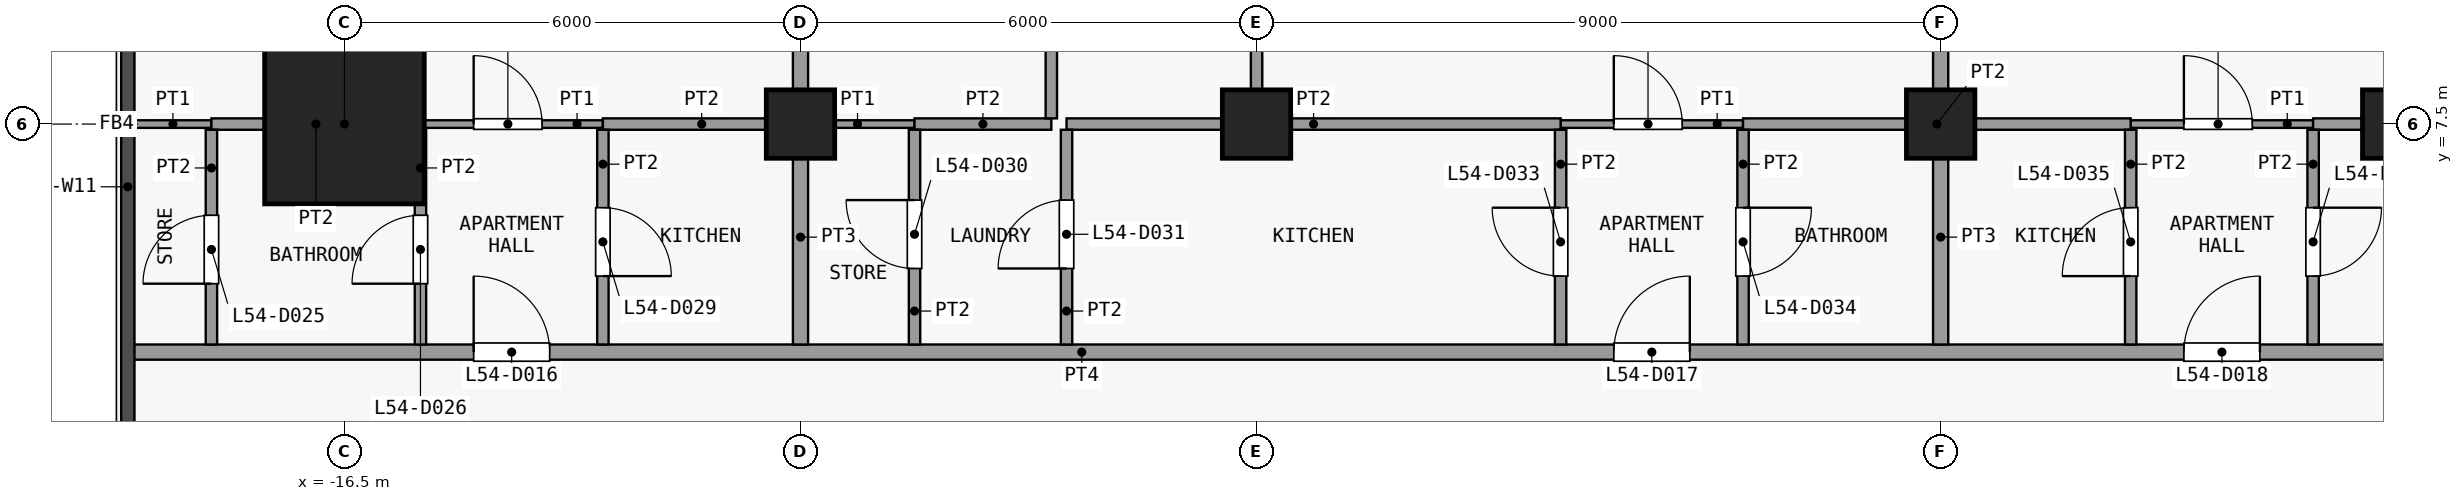
"""IFC4 building model, lengths in metres.
Left out: names, types, materials, properties, quantities, classifications, styles, units other than length and angle.
Written with IfcOpenShell. Run it as: python <this file> out.ifc"""

import sys

from ifc_helpers import new_model, si_unit, direction, frame, frame_2d, origin, origin_2d, place, context, subcontext, project, spatial, rectangle, extrude, element, fill, save


model = new_model("IFC4")
c1 = context("Model", 3, precision=1e-05, world=origin(), true_north=direction((0.0, 1.0)))
c2 = subcontext(c1, "Body", "Model", "MODEL_VIEW")
j1 = project(units=[si_unit("LENGTHUNIT", "METRE"), si_unit("PLANEANGLEUNIT", "RADIAN")], contexts=[c1])
p1 = place(None, origin())
s1 = spatial("IfcSite", under=j1, at=p1, CompositionType="ELEMENT")
p2 = place(p1, origin())
s2 = spatial("IfcBuilding", under=s1, at=p2, CompositionType="ELEMENT")
p3 = place(p2, frame((0.0, 0.0, 215.9)))
s3 = spatial("IfcBuildingStorey", under=s2, at=p3, CompositionType="ELEMENT", Elevation=215.9)
p4 = place(p3, frame((-16.5, 7.5, 0.0), z_axis=(0.0, 0.0, 1.0), x_axis=(1.0, 0.0, 0.0)))
e1 = element("IfcColumn", 1, at=p4, inside=s3, PredefinedType="COLUMN", context=c2, shape_type="SweptSolid", body=[
    extrude(rectangle(XDim=2.1, YDim=2.1, at=origin_2d()), origin(), (0.0, 0.0, 1.0), 3.6),
])
for number, where, z_axis, x_axis in (
    (2, (-10.5, 7.5, 0.0), (0.0, 0.0, 1.0), (1.0, 0.0, 0.0)),
    (3, (-4.5, 7.5, 0.0), (0.0, 0.0, 1.0), (1.0, 0.0, 0.0)),
    (4, (4.5, 7.5, 0.0), (0.0, 0.0, 1.0), (1.0, 0.0, 0.0)),
    (5, (10.5, 7.5, 0.0), (0.0, 0.0, 1.0), (1.0, 0.0, 0.0)),
):
    element("IfcColumn", number, at=place(p3, frame(where, z_axis=z_axis, x_axis=x_axis)), inside=s3, PredefinedType="COLUMN", context=c2, shape_type="SweptSolid", body=[
        extrude(rectangle(XDim=0.9, YDim=0.9, at=origin_2d()), origin(), (0.0, 0.0, 1.0), 3.6),
    ])
p5 = place(p3, frame((-19.35, 4.5, 0.0), z_axis=(0.0, 0.0, 1.0), x_axis=(1.0, 0.0, 0.0)))
e6 = element("IfcWall", 6, at=p5, inside=s3, PredefinedType="PARTITIONING", context=c2, shape_type="SweptSolid", body=[
    extrude(rectangle(XDim=38.7, YDim=0.2, at=frame_2d((19.35, 0.0))), origin(), (0.0, 0.0, 1.0), 3.3),
])
p6 = place(p5, frame((4.55, 0.0, 0.0)))
e7 = element("IfcOpeningElement", 7, at=p6, cuts=e6, PredefinedType="OPENING", context=c2, shape_type="SweptSolid", body=[
    extrude(rectangle(XDim=1.0, YDim=2.1, at=frame_2d((0.5, 1.05))), frame((0.0, 0.11, 0.0), z_axis=(0.0, -1.0, 0.0), x_axis=(1.0, 0.0, 0.0)), (0.0, 0.0, 1.0), 0.22),
])
p7 = place(p5, frame((19.55, 0.0, 0.0)))
e8 = element("IfcOpeningElement", 8, at=p7, cuts=e6, PredefinedType="OPENING", context=c2, shape_type="SweptSolid", body=[
    extrude(rectangle(XDim=1.0, YDim=2.1, at=frame_2d((0.5, 1.05))), frame((0.0, 0.11, 0.0), z_axis=(0.0, -1.0, 0.0), x_axis=(1.0, 0.0, 0.0)), (0.0, 0.0, 1.0), 0.22),
])
p8 = place(p5, frame((27.05, 0.0, 0.0)))
e9 = element("IfcOpeningElement", 9, at=p8, cuts=e6, PredefinedType="OPENING", context=c2, shape_type="SweptSolid", body=[
    extrude(rectangle(XDim=1.0, YDim=2.1, at=frame_2d((0.5, 1.05))), frame((0.0, 0.11, 0.0), z_axis=(0.0, -1.0, 0.0), x_axis=(1.0, 0.0, 0.0)), (0.0, 0.0, 1.0), 0.22),
])
p9 = place(p3, frame((-19.262, 7.5, 0.0), z_axis=(0.0, 0.0, 1.0), x_axis=(1.0, 0.0, 0.0)))
e10 = element("IfcWall", 10, at=p9, inside=s3, PredefinedType="PARTITIONING", context=c2, shape_type="SweptSolid", body=[
    extrude(rectangle(XDim=1.012, YDim=0.1, at=frame_2d((0.506, 0.0))), origin(), (0.0, 0.0, 1.0), 3.3),
])
p10 = place(p3, frame((-15.5, 7.5, 0.0), z_axis=(0.0, 0.0, 1.0), x_axis=(1.0, 0.0, 0.0)))
e11 = element("IfcWall", 11, at=p10, inside=s3, PredefinedType="PARTITIONING", context=c2, shape_type="SweptSolid", body=[
    extrude(rectangle(XDim=2.4, YDim=0.1, at=frame_2d((1.2, 0.0))), origin(), (0.0, 0.0, 1.0), 3.3),
])
p11 = place(p10, frame((0.7, 0.0, 0.0)))
e12 = element("IfcOpeningElement", 12, at=p11, cuts=e11, PredefinedType="OPENING", context=c2, shape_type="SweptSolid", body=[
    extrude(rectangle(XDim=0.9, YDim=2.1, at=frame_2d((0.45, 1.05))), frame((0.0, 0.06, 0.0), z_axis=(0.0, -1.0, 0.0), x_axis=(1.0, 0.0, 0.0)), (0.0, 0.0, 1.0), 0.12),
])
p12 = place(p3, frame((-10.5, 7.5, 0.0), z_axis=(0.0, 0.0, 1.0), x_axis=(1.0, 0.0, 0.0)))
e13 = element("IfcWall", 13, at=p12, inside=s3, PredefinedType="PARTITIONING", context=c2, shape_type="SweptSolid", body=[
    extrude(rectangle(XDim=1.5, YDim=0.1, at=frame_2d((0.75, 0.0))), origin(), (0.0, 0.0, 1.0), 3.3),
])
p13 = place(p3, frame((-0.5, 7.5, 0.0), z_axis=(0.0, 0.0, 1.0), x_axis=(1.0, 0.0, 0.0)))
e14 = element("IfcWall", 14, at=p13, inside=s3, PredefinedType="PARTITIONING", context=c2, shape_type="SweptSolid", body=[
    extrude(rectangle(XDim=2.4, YDim=0.1, at=frame_2d((1.2, 0.0))), origin(), (0.0, 0.0, 1.0), 3.3),
])
p14 = place(p13, frame((0.7, 0.0, 0.0)))
e15 = element("IfcOpeningElement", 15, at=p14, cuts=e14, PredefinedType="OPENING", context=c2, shape_type="SweptSolid", body=[
    extrude(rectangle(XDim=0.9, YDim=2.1, at=frame_2d((0.45, 1.05))), frame((0.0, 0.06, 0.0), z_axis=(0.0, -1.0, 0.0), x_axis=(1.0, 0.0, 0.0)), (0.0, 0.0, 1.0), 0.12),
])
p15 = place(p3, frame((7.0, 7.5, 0.0), z_axis=(0.0, 0.0, 1.0), x_axis=(1.0, 0.0, 0.0)))
e16 = element("IfcWall", 16, at=p15, inside=s3, PredefinedType="PARTITIONING", context=c2, shape_type="SweptSolid", body=[
    extrude(rectangle(XDim=2.4, YDim=0.1, at=frame_2d((1.2, 0.0))), origin(), (0.0, 0.0, 1.0), 3.3),
])
p16 = place(p15, frame((0.7, 0.0, 0.0)))
e17 = element("IfcOpeningElement", 17, at=p16, cuts=e16, PredefinedType="OPENING", context=c2, shape_type="SweptSolid", body=[
    extrude(rectangle(XDim=0.9, YDim=2.1, at=frame_2d((0.45, 1.05))), frame((0.0, 0.06, 0.0), z_axis=(0.0, -1.0, 0.0), x_axis=(1.0, 0.0, 0.0)), (0.0, 0.0, 1.0), 0.12),
])
p17 = place(p3, frame((-18.25, 7.5, 0.0), z_axis=(0.0, 0.0, 1.0), x_axis=(1.0, 0.0, 0.0)))
e18 = element("IfcWall", 18, at=p17, inside=s3, PredefinedType="PARTITIONING", context=c2, shape_type="SweptSolid", body=[
    extrude(rectangle(XDim=2.75, YDim=0.15, at=frame_2d((1.375, 0.0))), origin(), (0.0, 0.0, 1.0), 3.3),
])
p18 = place(p3, frame((-13.1, 7.5, 0.0), z_axis=(0.0, 0.0, 1.0), x_axis=(1.0, 0.0, 0.0)))
e19 = element("IfcWall", 19, at=p18, inside=s3, PredefinedType="PARTITIONING", context=c2, shape_type="SweptSolid", body=[
    extrude(rectangle(XDim=2.6, YDim=0.15, at=frame_2d((1.3, 0.0))), origin(), (0.0, 0.0, 1.0), 3.3),
])
p19 = place(p3, frame((-9.0, 7.5, 0.0), z_axis=(0.0, 0.0, 1.0), x_axis=(1.0, 0.0, 0.0)))
e20 = element("IfcWall", 20, at=p19, inside=s3, PredefinedType="PARTITIONING", context=c2, shape_type="SweptSolid", body=[
    extrude(rectangle(XDim=1.8, YDim=0.15, at=frame_2d((0.9, 0.0))), origin(), (0.0, 0.0, 1.0), 3.3),
])
p20 = place(p3, frame((-7.0, 7.5, 0.0), z_axis=(0.0, 0.0, 1.0), x_axis=(1.0, 0.0, 0.0)))
e21 = element("IfcWall", 21, at=p20, inside=s3, PredefinedType="PARTITIONING", context=c2, shape_type="SweptSolid", body=[
    extrude(rectangle(XDim=6.5, YDim=0.15, at=frame_2d((3.25, 0.0))), origin(), (0.0, 0.0, 1.0), 3.3),
])
p21 = place(p3, frame((1.9, 7.5, 0.0), z_axis=(0.0, 0.0, 1.0), x_axis=(1.0, 0.0, 0.0)))
e22 = element("IfcWall", 22, at=p21, inside=s3, PredefinedType="PARTITIONING", context=c2, shape_type="SweptSolid", body=[
    extrude(rectangle(XDim=5.1, YDim=0.15, at=frame_2d((2.55, 0.0))), origin(), (0.0, 0.0, 1.0), 3.3),
])
p22 = place(p3, frame((9.4, 7.5, 0.0), z_axis=(0.0, 0.0, 1.0), x_axis=(1.0, 0.0, 0.0)))
e23 = element("IfcWall", 23, at=p22, inside=s3, PredefinedType="PARTITIONING", context=c2, shape_type="SweptSolid", body=[
    extrude(rectangle(XDim=8.25, YDim=0.15, at=frame_2d((4.125, 0.0))), origin(), (0.0, 0.0, 1.0), 3.3),
])
p23 = place(p3, frame((-18.25, 4.6, 0.0), z_axis=(0.0, 0.0, 1.0), x_axis=(0.0, 1.0, 0.0)))
e24 = element("IfcWall", 24, at=p23, inside=s3, PredefinedType="PARTITIONING", context=c2, shape_type="SweptSolid", body=[
    extrude(rectangle(XDim=2.825, YDim=0.15, at=frame_2d((1.413, 0.0))), origin(), (0.0, 0.0, 1.0), 3.3),
])
p24 = place(p23, frame((0.8, 0.0, 0.0)))
e25 = element("IfcOpeningElement", 25, at=p24, cuts=e24, PredefinedType="OPENING", context=c2, shape_type="SweptSolid", body=[
    extrude(rectangle(XDim=0.9, YDim=2.1, at=frame_2d((0.45, 1.05))), frame((0.0, 0.085, 0.0), z_axis=(0.0, -1.0, 0.0), x_axis=(1.0, 0.0, 0.0)), (0.0, 0.0, 1.0), 0.17),
])
p25 = place(p3, frame((-15.5, 4.6, 0.0), z_axis=(0.0, 0.0, 1.0), x_axis=(0.0, 1.0, 0.0)))
e26 = element("IfcWall", 26, at=p25, inside=s3, PredefinedType="PARTITIONING", context=c2, shape_type="SweptSolid", body=[
    extrude(rectangle(XDim=2.825, YDim=0.15, at=frame_2d((1.413, 0.0))), origin(), (0.0, 0.0, 1.0), 3.3),
])
p26 = place(p25, frame((0.8, 0.0, 0.0)))
e27 = element("IfcOpeningElement", 27, at=p26, cuts=e26, PredefinedType="OPENING", context=c2, shape_type="SweptSolid", body=[
    extrude(rectangle(XDim=0.9, YDim=2.1, at=frame_2d((0.45, 1.05))), frame((0.0, 0.085, 0.0), z_axis=(0.0, -1.0, 0.0), x_axis=(1.0, 0.0, 0.0)), (0.0, 0.0, 1.0), 0.17),
])
p27 = place(p3, frame((-13.1, 4.6, 0.0), z_axis=(0.0, 0.0, 1.0), x_axis=(0.0, 1.0, 0.0)))
e28 = element("IfcWall", 28, at=p27, inside=s3, PredefinedType="PARTITIONING", context=c2, shape_type="SweptSolid", body=[
    extrude(rectangle(XDim=2.825, YDim=0.15, at=frame_2d((1.413, 0.0))), origin(), (0.0, 0.0, 1.0), 3.3),
])
p28 = place(p27, frame((0.9, 0.0, 0.0)))
e29 = element("IfcOpeningElement", 29, at=p28, cuts=e28, PredefinedType="OPENING", context=c2, shape_type="SweptSolid", body=[
    extrude(rectangle(XDim=0.9, YDim=2.1, at=frame_2d((0.45, 1.05))), frame((0.0, 0.085, 0.0), z_axis=(0.0, -1.0, 0.0), x_axis=(1.0, 0.0, 0.0)), (0.0, 0.0, 1.0), 0.17),
])
p29 = place(p3, frame((-10.5, 4.6, 0.0), z_axis=(0.0, 0.0, 1.0), x_axis=(0.0, 1.0, 0.0)))
e30 = element("IfcWall", 30, at=p29, inside=s3, PredefinedType="PARTITIONING", context=c2, shape_type="SweptSolid", body=[
    extrude(rectangle(XDim=2.825, YDim=0.2, at=frame_2d((1.413, 0.0))), origin(), (0.0, 0.0, 1.0), 3.3),
])
p30 = place(p3, frame((-10.5, 7.575, 0.0), z_axis=(0.0, 0.0, 1.0), x_axis=(0.0, 1.0, 0.0)))
e31 = element("IfcWall", 31, at=p30, inside=s3, PredefinedType="PARTITIONING", context=c2, shape_type="SweptSolid", body=[
    extrude(rectangle(XDim=8.688, YDim=0.2, at=frame_2d((4.344, 0.0))), origin(), (0.0, 0.0, 1.0), 3.3),
])
p31 = place(p3, frame((-9.0, 4.6, 0.0), z_axis=(0.0, 0.0, 1.0), x_axis=(0.0, 1.0, 0.0)))
e32 = element("IfcWall", 32, at=p31, inside=s3, PredefinedType="PARTITIONING", context=c2, shape_type="SweptSolid", body=[
    extrude(rectangle(XDim=2.825, YDim=0.15, at=frame_2d((1.413, 0.0))), origin(), (0.0, 0.0, 1.0), 3.3),
])
p32 = place(p31, frame((1.0, 0.0, 0.0)))
e33 = element("IfcOpeningElement", 33, at=p32, cuts=e32, PredefinedType="OPENING", context=c2, shape_type="SweptSolid", body=[
    extrude(rectangle(XDim=0.9, YDim=2.1, at=frame_2d((0.45, 1.05))), frame((0.0, 0.085, 0.0), z_axis=(0.0, -1.0, 0.0), x_axis=(1.0, 0.0, 0.0)), (0.0, 0.0, 1.0), 0.17),
])
p33 = place(p3, frame((-7.2, 7.575, 0.0), z_axis=(0.0, 0.0, 1.0), x_axis=(0.0, 1.0, 0.0)))
e34 = element("IfcWall", 34, at=p33, inside=s3, PredefinedType="PARTITIONING", context=c2, shape_type="SweptSolid", body=[
    extrude(rectangle(XDim=2.85, YDim=0.15, at=frame_2d((1.425, 0.0))), origin(), (0.0, 0.0, 1.0), 3.3),
])
p34 = place(p3, frame((-7.0, 4.6, 0.0), z_axis=(0.0, 0.0, 1.0), x_axis=(0.0, 1.0, 0.0)))
e35 = element("IfcWall", 35, at=p34, inside=s3, PredefinedType="PARTITIONING", context=c2, shape_type="SweptSolid", body=[
    extrude(rectangle(XDim=2.825, YDim=0.15, at=frame_2d((1.413, 0.0))), origin(), (0.0, 0.0, 1.0), 3.3),
])
p35 = place(p34, frame((1.0, 0.0, 0.0)))
e36 = element("IfcOpeningElement", 36, at=p35, cuts=e35, PredefinedType="OPENING", context=c2, shape_type="SweptSolid", body=[
    extrude(rectangle(XDim=0.9, YDim=2.1, at=frame_2d((0.45, 1.05))), frame((0.0, 0.085, 0.0), z_axis=(0.0, -1.0, 0.0), x_axis=(1.0, 0.0, 0.0)), (0.0, 0.0, 1.0), 0.17),
])
p36 = place(p3, frame((-4.5, 7.575, 0.0), z_axis=(0.0, 0.0, 1.0), x_axis=(0.0, 1.0, 0.0)))
e37 = element("IfcWall", 37, at=p36, inside=s3, PredefinedType="PARTITIONING", context=c2, shape_type="SweptSolid", body=[
    extrude(rectangle(XDim=2.925, YDim=0.15, at=frame_2d((1.462, 0.0))), origin(), (0.0, 0.0, 1.0), 3.3),
])
p37 = place(p3, frame((-0.5, 4.6, 0.0), z_axis=(0.0, 0.0, 1.0), x_axis=(0.0, 1.0, 0.0)))
e38 = element("IfcWall", 38, at=p37, inside=s3, PredefinedType="PARTITIONING", context=c2, shape_type="SweptSolid", body=[
    extrude(rectangle(XDim=2.825, YDim=0.15, at=frame_2d((1.413, 0.0))), origin(), (0.0, 0.0, 1.0), 3.3),
])
p38 = place(p37, frame((0.9, 0.0, 0.0)))
e39 = element("IfcOpeningElement", 39, at=p38, cuts=e38, PredefinedType="OPENING", context=c2, shape_type="SweptSolid", body=[
    extrude(rectangle(XDim=0.9, YDim=2.1, at=frame_2d((0.45, 1.05))), frame((0.0, 0.085, 0.0), z_axis=(0.0, -1.0, 0.0), x_axis=(1.0, 0.0, 0.0)), (0.0, 0.0, 1.0), 0.17),
])
p39 = place(p3, frame((1.9, 4.6, 0.0), z_axis=(0.0, 0.0, 1.0), x_axis=(0.0, 1.0, 0.0)))
e40 = element("IfcWall", 40, at=p39, inside=s3, PredefinedType="PARTITIONING", context=c2, shape_type="SweptSolid", body=[
    extrude(rectangle(XDim=2.825, YDim=0.15, at=frame_2d((1.413, 0.0))), origin(), (0.0, 0.0, 1.0), 3.3),
])
p40 = place(p39, frame((0.9, 0.0, 0.0)))
e41 = element("IfcOpeningElement", 41, at=p40, cuts=e40, PredefinedType="OPENING", context=c2, shape_type="SweptSolid", body=[
    extrude(rectangle(XDim=0.9, YDim=2.1, at=frame_2d((0.45, 1.05))), frame((0.0, 0.085, 0.0), z_axis=(0.0, -1.0, 0.0), x_axis=(1.0, 0.0, 0.0)), (0.0, 0.0, 1.0), 0.17),
])
p41 = place(p3, frame((4.5, 4.6, 0.0), z_axis=(0.0, 0.0, 1.0), x_axis=(0.0, 1.0, 0.0)))
e42 = element("IfcWall", 42, at=p41, inside=s3, PredefinedType="PARTITIONING", context=c2, shape_type="SweptSolid", body=[
    extrude(rectangle(XDim=2.825, YDim=0.2, at=frame_2d((1.413, 0.0))), origin(), (0.0, 0.0, 1.0), 3.3),
])
p42 = place(p3, frame((4.5, 7.575, 0.0), z_axis=(0.0, 0.0, 1.0), x_axis=(0.0, 1.0, 0.0)))
e43 = element("IfcWall", 43, at=p42, inside=s3, PredefinedType="PARTITIONING", context=c2, shape_type="SweptSolid", body=[
    extrude(rectangle(XDim=8.688, YDim=0.2, at=frame_2d((4.344, 0.0))), origin(), (0.0, 0.0, 1.0), 3.3),
])
p43 = place(p3, frame((7.0, 4.6, 0.0), z_axis=(0.0, 0.0, 1.0), x_axis=(0.0, 1.0, 0.0)))
e44 = element("IfcWall", 44, at=p43, inside=s3, PredefinedType="PARTITIONING", context=c2, shape_type="SweptSolid", body=[
    extrude(rectangle(XDim=2.825, YDim=0.15, at=frame_2d((1.413, 0.0))), origin(), (0.0, 0.0, 1.0), 3.3),
])
p44 = place(p43, frame((0.9, 0.0, 0.0)))
e45 = element("IfcOpeningElement", 45, at=p44, cuts=e44, PredefinedType="OPENING", context=c2, shape_type="SweptSolid", body=[
    extrude(rectangle(XDim=0.9, YDim=2.1, at=frame_2d((0.45, 1.05))), frame((0.0, 0.085, 0.0), z_axis=(0.0, -1.0, 0.0), x_axis=(1.0, 0.0, 0.0)), (0.0, 0.0, 1.0), 0.17),
])
p45 = place(p3, frame((9.4, 4.6, 0.0), z_axis=(0.0, 0.0, 1.0), x_axis=(0.0, 1.0, 0.0)))
e46 = element("IfcWall", 46, at=p45, inside=s3, PredefinedType="PARTITIONING", context=c2, shape_type="SweptSolid", body=[
    extrude(rectangle(XDim=2.825, YDim=0.15, at=frame_2d((1.413, 0.0))), origin(), (0.0, 0.0, 1.0), 3.3),
])
p46 = place(p45, frame((0.9, 0.0, 0.0)))
e47 = element("IfcOpeningElement", 47, at=p46, cuts=e46, PredefinedType="OPENING", context=c2, shape_type="SweptSolid", body=[
    extrude(rectangle(XDim=0.9, YDim=2.1, at=frame_2d((0.45, 1.05))), frame((0.0, 0.085, 0.0), z_axis=(0.0, -1.0, 0.0), x_axis=(1.0, 0.0, 0.0)), (0.0, 0.0, 1.0), 0.17),
])
p47 = place(p6, origin())
e48 = element("IfcDoor", 48, at=p47, inside=s3, OperationType="SINGLE_SWING_RIGHT", PredefinedType="DOOR", context=c2, shape_type="SweptSolid", body=[
    extrude(rectangle(XDim=1.0, YDim=2.1, at=frame_2d((0.5, 1.05))), frame((0.0, 0.025, 0.0), z_axis=(0.0, -1.0, 0.0), x_axis=(1.0, 0.0, 0.0)), (0.0, 0.0, 1.0), 0.05),
])
fill(e7, e48)
p48 = place(p7, origin())
e49 = element("IfcDoor", 49, at=p48, inside=s3, OperationType="SINGLE_SWING_LEFT", PredefinedType="DOOR", context=c2, shape_type="SweptSolid", body=[
    extrude(rectangle(XDim=1.0, YDim=2.1, at=frame_2d((0.5, 1.05))), frame((0.0, 0.025, 0.0), z_axis=(0.0, -1.0, 0.0), x_axis=(1.0, 0.0, 0.0)), (0.0, 0.0, 1.0), 0.05),
])
fill(e8, e49)
p49 = place(p8, origin())
e50 = element("IfcDoor", 50, at=p49, inside=s3, OperationType="SINGLE_SWING_LEFT", PredefinedType="DOOR", context=c2, shape_type="SweptSolid", body=[
    extrude(rectangle(XDim=1.0, YDim=2.1, at=frame_2d((0.5, 1.05))), frame((0.0, 0.025, 0.0), z_axis=(0.0, -1.0, 0.0), x_axis=(1.0, 0.0, 0.0)), (0.0, 0.0, 1.0), 0.05),
])
fill(e9, e50)
p50 = place(p11, origin())
e51 = element("IfcDoor", 51, at=p50, inside=s3, OperationType="SINGLE_SWING_RIGHT", PredefinedType="DOOR", context=c2, shape_type="SweptSolid", body=[
    extrude(rectangle(XDim=0.9, YDim=2.1, at=frame_2d((0.45, 1.05))), frame((0.0, 0.025, 0.0), z_axis=(0.0, -1.0, 0.0), x_axis=(1.0, 0.0, 0.0)), (0.0, 0.0, 1.0), 0.05),
])
fill(e12, e51)
p51 = place(p14, origin())
e52 = element("IfcDoor", 52, at=p51, inside=s3, OperationType="SINGLE_SWING_RIGHT", PredefinedType="DOOR", context=c2, shape_type="SweptSolid", body=[
    extrude(rectangle(XDim=0.9, YDim=2.1, at=frame_2d((0.45, 1.05))), frame((0.0, 0.025, 0.0), z_axis=(0.0, -1.0, 0.0), x_axis=(1.0, 0.0, 0.0)), (0.0, 0.0, 1.0), 0.05),
])
fill(e15, e52)
p52 = place(p16, origin())
e53 = element("IfcDoor", 53, at=p52, inside=s3, OperationType="SINGLE_SWING_RIGHT", PredefinedType="DOOR", context=c2, shape_type="SweptSolid", body=[
    extrude(rectangle(XDim=0.9, YDim=2.1, at=frame_2d((0.45, 1.05))), frame((0.0, 0.025, 0.0), z_axis=(0.0, -1.0, 0.0), x_axis=(1.0, 0.0, 0.0)), (0.0, 0.0, 1.0), 0.05),
])
fill(e17, e53)
p53 = place(p24, origin())
e54 = element("IfcDoor", 54, at=p53, inside=s3, OperationType="SINGLE_SWING_RIGHT", PredefinedType="DOOR", context=c2, shape_type="SweptSolid", body=[
    extrude(rectangle(XDim=0.9, YDim=2.1, at=frame_2d((0.45, 1.05))), frame((0.0, 0.025, 0.0), z_axis=(0.0, -1.0, 0.0), x_axis=(1.0, 0.0, 0.0)), (0.0, 0.0, 1.0), 0.05),
])
fill(e25, e54)
p54 = place(p26, origin())
e55 = element("IfcDoor", 55, at=p54, inside=s3, OperationType="SINGLE_SWING_RIGHT", PredefinedType="DOOR", context=c2, shape_type="SweptSolid", body=[
    extrude(rectangle(XDim=0.9, YDim=2.1, at=frame_2d((0.45, 1.05))), frame((0.0, 0.025, 0.0), z_axis=(0.0, -1.0, 0.0), x_axis=(1.0, 0.0, 0.0)), (0.0, 0.0, 1.0), 0.05),
])
fill(e27, e55)
p55 = place(p28, origin())
e56 = element("IfcDoor", 56, at=p55, inside=s3, OperationType="SINGLE_SWING_LEFT", PredefinedType="DOOR", context=c2, shape_type="SweptSolid", body=[
    extrude(rectangle(XDim=0.9, YDim=2.1, at=frame_2d((0.45, 1.05))), frame((0.0, 0.025, 0.0), z_axis=(0.0, -1.0, 0.0), x_axis=(1.0, 0.0, 0.0)), (0.0, 0.0, 1.0), 0.05),
])
fill(e29, e56)
p56 = place(p32, origin())
e57 = element("IfcDoor", 57, at=p56, inside=s3, OperationType="SINGLE_SWING_LEFT", PredefinedType="DOOR", context=c2, shape_type="SweptSolid", body=[
    extrude(rectangle(XDim=0.9, YDim=2.1, at=frame_2d((0.45, 1.05))), frame((0.0, 0.025, 0.0), z_axis=(0.0, -1.0, 0.0), x_axis=(1.0, 0.0, 0.0)), (0.0, 0.0, 1.0), 0.05),
])
fill(e33, e57)
p57 = place(p35, origin())
e58 = element("IfcDoor", 58, at=p57, inside=s3, OperationType="SINGLE_SWING_RIGHT", PredefinedType="DOOR", context=c2, shape_type="SweptSolid", body=[
    extrude(rectangle(XDim=0.9, YDim=2.1, at=frame_2d((0.45, 1.05))), frame((0.0, 0.025, 0.0), z_axis=(0.0, -1.0, 0.0), x_axis=(1.0, 0.0, 0.0)), (0.0, 0.0, 1.0), 0.05),
])
fill(e36, e58)
p58 = place(p38, origin())
e59 = element("IfcDoor", 59, at=p58, inside=s3, OperationType="SINGLE_SWING_LEFT", PredefinedType="DOOR", context=c2, shape_type="SweptSolid", body=[
    extrude(rectangle(XDim=0.9, YDim=2.1, at=frame_2d((0.45, 1.05))), frame((0.0, 0.025, 0.0), z_axis=(0.0, -1.0, 0.0), x_axis=(1.0, 0.0, 0.0)), (0.0, 0.0, 1.0), 0.05),
])
fill(e39, e59)
p59 = place(p40, origin())
e60 = element("IfcDoor", 60, at=p59, inside=s3, OperationType="SINGLE_SWING_RIGHT", PredefinedType="DOOR", context=c2, shape_type="SweptSolid", body=[
    extrude(rectangle(XDim=0.9, YDim=2.1, at=frame_2d((0.45, 1.05))), frame((0.0, 0.025, 0.0), z_axis=(0.0, -1.0, 0.0), x_axis=(1.0, 0.0, 0.0)), (0.0, 0.0, 1.0), 0.05),
])
fill(e41, e60)
p60 = place(p44, origin())
e61 = element("IfcDoor", 61, at=p60, inside=s3, OperationType="SINGLE_SWING_RIGHT", PredefinedType="DOOR", context=c2, shape_type="SweptSolid", body=[
    extrude(rectangle(XDim=0.9, YDim=2.1, at=frame_2d((0.45, 1.05))), frame((0.0, 0.025, 0.0), z_axis=(0.0, -1.0, 0.0), x_axis=(1.0, 0.0, 0.0)), (0.0, 0.0, 1.0), 0.05),
])
fill(e45, e61)
p61 = place(p46, origin())
e62 = element("IfcDoor", 62, at=p61, inside=s3, OperationType="SINGLE_SWING_RIGHT", PredefinedType="DOOR", context=c2, shape_type="SweptSolid", body=[
    extrude(rectangle(XDim=0.9, YDim=2.1, at=frame_2d((0.45, 1.05))), frame((0.0, 0.025, 0.0), z_axis=(0.0, -1.0, 0.0), x_axis=(1.0, 0.0, 0.0)), (0.0, 0.0, 1.0), 0.05),
])
fill(e47, e62)
save(model, sys.argv[1])
